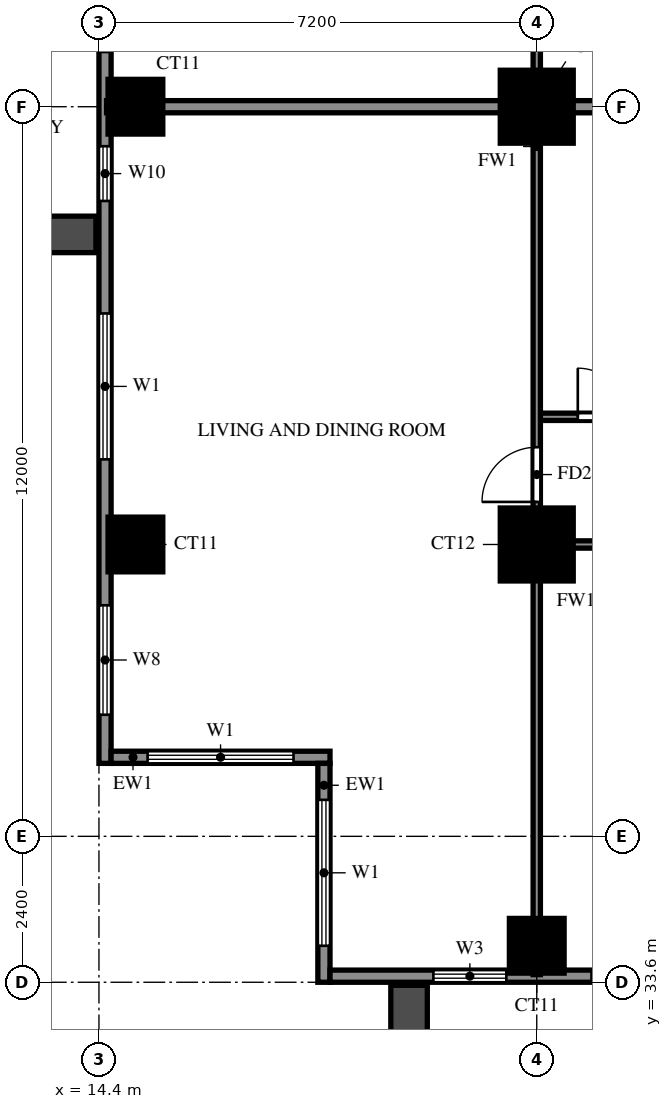
"""IFC4 building model, lengths in metres.
Left out: names, types, materials, properties, quantities, classifications, styles, units other than length and angle.
Written with IfcOpenShell. Run it as: python <this file> out.ifc"""

import sys

from ifc_helpers import new_model, si_unit, direction, frame, frame_2d, origin, origin_2d, place, context, subcontext, project, spatial, rectangle, extrude, source, transform, mapped, element, fill, save


model = new_model("IFC4")
c1 = context("Model", 3, precision=1e-05, world=origin(), true_north=direction((0.0, 1.0)))
c2 = subcontext(c1, "Body", "Model", "MODEL_VIEW")
j1 = project(units=[si_unit("LENGTHUNIT", "METRE"), si_unit("PLANEANGLEUNIT", "RADIAN")], contexts=[c1])
p1 = place(None, origin())
s1 = spatial("IfcSite", under=j1, at=p1, CompositionType="ELEMENT")
p2 = place(p1, origin())
s2 = spatial("IfcBuilding", under=s1, at=p2, CompositionType="ELEMENT")
p3 = place(p2, frame((0.0, 0.0, 97.0)))
s3 = spatial("IfcBuildingStorey", under=s2, at=p3, CompositionType="ELEMENT", Elevation=97.0)
m1 = source(origin(), c2, "Body", "SweptSolid", [
    extrude(rectangle(XDim=0.9, YDim=0.9, at=origin_2d()), origin(), (0.0, 0.0, 1.0), 3.18),
])
for number, where, z_axis, x_axis in (
    (1, (21.6, 34.2, 0.0), (0.0, 0.0, 1.0), (1.0, 0.0, 0.0)),
    (2, (15.0, 40.8, 0.0), (0.0, 0.0, 1.0), (1.0, 0.0, 0.0)),
):
    element("IfcColumn", number, at=place(p3, frame(where, z_axis=z_axis, x_axis=x_axis)), inside=s3, PredefinedType="COLUMN", context=c2, shape_type="MappedRepresentation", body=[
        mapped(m1, transform((0.0, 0.0, 0.0))),
    ])
m2 = source(origin(), c2, "Body", "SweptSolid", [
    extrude(rectangle(XDim=1.2, YDim=1.2, at=origin_2d()), origin(), (0.0, 0.0, 1.0), 3.18),
])
p4 = place(p3, frame((21.6, 40.8, 0.0), z_axis=(0.0, 0.0, 1.0), x_axis=(1.0, 0.0, 0.0)))
e3 = element("IfcColumn", 3, at=p4, inside=s3, PredefinedType="COLUMN", context=c2, shape_type="MappedRepresentation", body=[
    mapped(m2, transform((0.0, 0.0, 0.0))),
])
p5 = place(p3, frame((15.0, 48.0, 0.0), z_axis=(0.0, 0.0, 1.0), x_axis=(1.0, 0.0, 0.0)))
e4 = element("IfcColumn", 4, at=p5, inside=s3, PredefinedType="COLUMN", context=c2, shape_type="MappedRepresentation", body=[
    mapped(m1, transform((0.0, 0.0, 0.0))),
])
p6 = place(p3, frame((21.6, 48.0, 0.0), z_axis=(0.0, 0.0, 1.0), x_axis=(1.0, 0.0, 0.0)))
e5 = element("IfcColumn", 5, at=p6, inside=s3, PredefinedType="COLUMN", context=c2, shape_type="MappedRepresentation", body=[
    mapped(m2, transform((0.0, 0.0, 0.0))),
])
p7 = place(p3, frame((14.5, 76.6, 0.0), z_axis=(0.0, 0.0, 1.0), x_axis=(0.0, -1.0, 0.0)))
e6 = element("IfcWall", 6, at=p7, inside=s3, PredefinedType="SOLIDWALL", context=c2, shape_type="SweptSolid", body=[
    extrude(rectangle(XDim=39.4, YDim=0.2, at=frame_2d((19.7, 0.0))), origin(), (0.0, 0.0, 1.0), 3.18),
])
p8 = place(p7, frame((25.9, 0.0, 0.0)))
e7 = element("IfcOpeningElement", 7, at=p8, cuts=e6, PredefinedType="OPENING", context=c2, shape_type="SweptSolid", body=[
    extrude(rectangle(XDim=1.8, YDim=2.4, at=frame_2d((0.9, 1.2))), frame((0.0, 0.11, 0.0), z_axis=(0.0, -1.0, 0.0), x_axis=(1.0, 0.0, 0.0)), (0.0, 0.0, 1.0), 0.22),
])
p9 = place(p7, frame((29.25, 0.0, 0.6)))
e8 = element("IfcOpeningElement", 8, at=p9, cuts=e6, PredefinedType="OPENING", context=c2, shape_type="SweptSolid", body=[
    extrude(rectangle(XDim=0.9, YDim=2.4, at=frame_2d((0.45, 1.2))), frame((0.0, 0.11, 0.0), z_axis=(0.0, -1.0, 0.0), x_axis=(1.0, 0.0, 0.0)), (0.0, 0.0, 1.0), 0.22),
])
p10 = place(p7, frame((32.0, 0.0, 0.6)))
e9 = element("IfcOpeningElement", 9, at=p10, cuts=e6, PredefinedType="OPENING", context=c2, shape_type="SweptSolid", body=[
    extrude(rectangle(XDim=2.4, YDim=2.4, at=frame_2d((1.2, 1.2))), frame((0.0, 0.11, 0.0), z_axis=(0.0, -1.0, 0.0), x_axis=(1.0, 0.0, 0.0)), (0.0, 0.0, 1.0), 0.22),
])
p11 = place(p7, frame((36.8, 0.0, 0.6)))
e10 = element("IfcOpeningElement", 10, at=p11, cuts=e6, PredefinedType="OPENING", context=c2, shape_type="SweptSolid", body=[
    extrude(rectangle(XDim=1.8, YDim=2.4, at=frame_2d((0.9, 1.2))), frame((0.0, 0.11, 0.0), z_axis=(0.0, -1.0, 0.0), x_axis=(1.0, 0.0, 0.0)), (0.0, 0.0, 1.0), 0.22),
])
p12 = place(p7, frame((22.2, 0.0, 0.6)))
e11 = element("IfcOpeningElement", 11, at=p12, cuts=e6, PredefinedType="OPENING", context=c2, shape_type="SweptSolid", body=[
    extrude(rectangle(XDim=1.2, YDim=2.4, at=frame_2d((0.6, 1.2))), frame((0.0, 0.11, 0.0), z_axis=(0.0, -1.0, 0.0), x_axis=(1.0, 0.0, 0.0)), (0.0, 0.0, 1.0), 0.22),
])
p13 = place(p7, frame((24.55, 0.0, 0.6)))
e12 = element("IfcOpeningElement", 12, at=p13, cuts=e6, PredefinedType="OPENING", context=c2, shape_type="SweptSolid", body=[
    extrude(rectangle(XDim=0.9, YDim=2.4, at=frame_2d((0.45, 1.2))), frame((0.0, 0.11, 0.0), z_axis=(0.0, -1.0, 0.0), x_axis=(1.0, 0.0, 0.0)), (0.0, 0.0, 1.0), 0.22),
])
p14 = place(p7, frame((18.2, 0.0, 0.6)))
e13 = element("IfcOpeningElement", 13, at=p14, cuts=e6, PredefinedType="OPENING", context=c2, shape_type="SweptSolid", body=[
    extrude(rectangle(XDim=2.4, YDim=2.4, at=frame_2d((1.2, 1.2))), frame((0.0, 0.11, 0.0), z_axis=(0.0, -1.0, 0.0), x_axis=(1.0, 0.0, 0.0)), (0.0, 0.0, 1.0), 0.22),
])
p15 = place(p7, frame((15.3, 0.0, 0.6)))
e14 = element("IfcOpeningElement", 14, at=p15, cuts=e6, PredefinedType="OPENING", context=c2, shape_type="SweptSolid", body=[
    extrude(rectangle(XDim=1.8, YDim=2.4, at=frame_2d((0.9, 1.2))), frame((0.0, 0.11, 0.0), z_axis=(0.0, -1.0, 0.0), x_axis=(1.0, 0.0, 0.0)), (0.0, 0.0, 1.0), 0.22),
])
p16 = place(p7, frame((11.75, 0.0, 1.5)))
e15 = element("IfcOpeningElement", 15, at=p16, cuts=e6, PredefinedType="OPENING", context=c2, shape_type="SweptSolid", body=[
    extrude(rectangle(XDim=0.9, YDim=0.9, at=frame_2d((0.45, 0.45))), frame((0.0, 0.11, 0.0), z_axis=(0.0, -1.0, 0.0), x_axis=(1.0, 0.0, 0.0)), (0.0, 0.0, 1.0), 0.22),
])
p17 = place(p7, frame((7.8, 0.0, 0.6)))
e16 = element("IfcOpeningElement", 16, at=p17, cuts=e6, PredefinedType="OPENING", context=c2, shape_type="SweptSolid", body=[
    extrude(rectangle(XDim=2.4, YDim=2.4, at=frame_2d((1.2, 1.2))), frame((0.0, 0.11, 0.0), z_axis=(0.0, -1.0, 0.0), x_axis=(1.0, 0.0, 0.0)), (0.0, 0.0, 1.0), 0.22),
])
p18 = place(p7, frame((3.8, 0.0, 0.6)))
e17 = element("IfcOpeningElement", 17, at=p18, cuts=e6, PredefinedType="OPENING", context=c2, shape_type="SweptSolid", body=[
    extrude(rectangle(XDim=2.4, YDim=2.4, at=frame_2d((1.2, 1.2))), frame((0.0, 0.11, 0.0), z_axis=(0.0, -1.0, 0.0), x_axis=(1.0, 0.0, 0.0)), (0.0, 0.0, 1.0), 0.22),
])
p19 = place(p7, frame((0.6, 0.0, 0.6)))
e18 = element("IfcOpeningElement", 18, at=p19, cuts=e6, PredefinedType="OPENING", context=c2, shape_type="SweptSolid", body=[
    extrude(rectangle(XDim=2.4, YDim=2.4, at=frame_2d((1.2, 1.2))), frame((0.0, 0.11, 0.0), z_axis=(0.0, -1.0, 0.0), x_axis=(1.0, 0.0, 0.0)), (0.0, 0.0, 1.0), 0.22),
])
p20 = place(p3, frame((14.6, 37.3, 0.0), z_axis=(0.0, 0.0, 1.0), x_axis=(1.0, 0.0, 0.0)))
e19 = element("IfcWall", 19, at=p20, inside=s3, PredefinedType="SOLIDWALL", context=c2, shape_type="SweptSolid", body=[
    extrude(rectangle(XDim=3.6, YDim=0.2, at=frame_2d((1.8, 0.0))), origin(), (0.0, 0.0, 1.0), 3.18),
])
p21 = place(p20, frame((0.6, 0.0, 0.6)))
e20 = element("IfcOpeningElement", 20, at=p21, cuts=e19, PredefinedType="OPENING", context=c2, shape_type="SweptSolid", body=[
    extrude(rectangle(XDim=2.4, YDim=2.4, at=frame_2d((1.2, 1.2))), frame((0.0, 0.11, 0.0), z_axis=(0.0, -1.0, 0.0), x_axis=(1.0, 0.0, 0.0)), (0.0, 0.0, 1.0), 0.22),
])
p22 = place(p3, frame((18.1, 37.2, 0.0), z_axis=(0.0, 0.0, 1.0), x_axis=(0.0, -1.0, 0.0)))
e21 = element("IfcWall", 21, at=p22, inside=s3, PredefinedType="SOLIDWALL", context=c2, shape_type="SweptSolid", body=[
    extrude(rectangle(XDim=3.6, YDim=0.2, at=frame_2d((1.8, 0.0))), origin(), (0.0, 0.0, 1.0), 3.18),
])
p23 = place(p22, frame((0.6, 0.0, 0.6)))
e22 = element("IfcOpeningElement", 22, at=p23, cuts=e21, PredefinedType="OPENING", context=c2, shape_type="SweptSolid", body=[
    extrude(rectangle(XDim=2.4, YDim=2.4, at=frame_2d((1.2, 1.2))), frame((0.0, 0.11, 0.0), z_axis=(0.0, -1.0, 0.0), x_axis=(1.0, 0.0, 0.0)), (0.0, 0.0, 1.0), 0.22),
])
p24 = place(p3, frame((18.2, 33.7, 0.0), z_axis=(0.0, 0.0, 1.0), x_axis=(1.0, 0.0, 0.0)))
e23 = element("IfcWall", 23, at=p24, inside=s3, PredefinedType="SOLIDWALL", context=c2, shape_type="SweptSolid", body=[
    extrude(rectangle(XDim=23.8, YDim=0.2, at=frame_2d((11.9, 0.0))), origin(), (0.0, 0.0, 1.0), 3.18),
])
p25 = place(p24, frame((4.3, 0.0, 0.0)))
e24 = element("IfcOpeningElement", 24, at=p25, cuts=e23, PredefinedType="OPENING", context=c2, shape_type="SweptSolid", body=[
    extrude(rectangle(XDim=1.8, YDim=2.4, at=frame_2d((0.9, 1.2))), frame((0.0, 0.11, 0.0), z_axis=(0.0, -1.0, 0.0), x_axis=(1.0, 0.0, 0.0)), (0.0, 0.0, 1.0), 0.22),
])
p26 = place(p24, frame((18.7, 0.0, 0.0)))
e25 = element("IfcOpeningElement", 25, at=p26, cuts=e23, PredefinedType="OPENING", context=c2, shape_type="SweptSolid", body=[
    extrude(rectangle(XDim=1.8, YDim=2.4, at=frame_2d((0.9, 1.2))), frame((0.0, 0.11, 0.0), z_axis=(0.0, -1.0, 0.0), x_axis=(1.0, 0.0, 0.0)), (0.0, 0.0, 1.0), 0.22),
])
p27 = place(p24, frame((1.7, 0.0, 0.6)))
e26 = element("IfcOpeningElement", 26, at=p27, cuts=e23, PredefinedType="OPENING", context=c2, shape_type="SweptSolid", body=[
    extrude(rectangle(XDim=1.2, YDim=2.4, at=frame_2d((0.6, 1.2))), frame((0.0, 0.11, 0.0), z_axis=(0.0, -1.0, 0.0), x_axis=(1.0, 0.0, 0.0)), (0.0, 0.0, 1.0), 0.22),
])
p28 = place(p24, frame((8.75, 0.0, 1.5)))
e27 = element("IfcOpeningElement", 27, at=p28, cuts=e23, PredefinedType="OPENING", context=c2, shape_type="SweptSolid", body=[
    extrude(rectangle(XDim=0.9, YDim=0.9, at=frame_2d((0.45, 0.45))), frame((0.0, 0.11, 0.0), z_axis=(0.0, -1.0, 0.0), x_axis=(1.0, 0.0, 0.0)), (0.0, 0.0, 1.0), 0.22),
])
p29 = place(p24, frame((11.4, 0.0, 0.6)))
e28 = element("IfcOpeningElement", 28, at=p29, cuts=e23, PredefinedType="OPENING", context=c2, shape_type="SweptSolid", body=[
    extrude(rectangle(XDim=2.4, YDim=2.4, at=frame_2d((1.2, 1.2))), frame((0.0, 0.11, 0.0), z_axis=(0.0, -1.0, 0.0), x_axis=(1.0, 0.0, 0.0)), (0.0, 0.0, 1.0), 0.22),
])
p30 = place(p24, frame((14.35, 0.0, 0.6)))
e29 = element("IfcOpeningElement", 29, at=p30, cuts=e23, PredefinedType="OPENING", context=c2, shape_type="SweptSolid", body=[
    extrude(rectangle(XDim=0.9, YDim=2.4, at=frame_2d((0.45, 1.2))), frame((0.0, 0.11, 0.0), z_axis=(0.0, -1.0, 0.0), x_axis=(1.0, 0.0, 0.0)), (0.0, 0.0, 1.0), 0.22),
])
p31 = place(p24, frame((16.25, 0.0, 0.6)))
e30 = element("IfcOpeningElement", 30, at=p31, cuts=e23, PredefinedType="OPENING", context=c2, shape_type="SweptSolid", body=[
    extrude(rectangle(XDim=0.9, YDim=2.4, at=frame_2d((0.45, 1.2))), frame((0.0, 0.11, 0.0), z_axis=(0.0, -1.0, 0.0), x_axis=(1.0, 0.0, 0.0)), (0.0, 0.0, 1.0), 0.22),
])
p32 = place(p24, frame((20.95, 0.0, 0.6)))
e31 = element("IfcOpeningElement", 31, at=p32, cuts=e23, PredefinedType="OPENING", context=c2, shape_type="SweptSolid", body=[
    extrude(rectangle(XDim=0.9, YDim=2.4, at=frame_2d((0.45, 1.2))), frame((0.0, 0.11, 0.0), z_axis=(0.0, -1.0, 0.0), x_axis=(1.0, 0.0, 0.0)), (0.0, 0.0, 1.0), 0.22),
])
for number, where, z_axis, x_axis in (
    (32, (14.35, 45.9, 0.0), (0.0, 0.0, 1.0), (-1.0, 0.0, 0.0)),
    (33, (19.5, 33.55, 0.0), (0.0, 0.0, 1.0), (0.0, -1.0, 0.0)),
):
    element("IfcWall", number, at=place(p3, frame(where, z_axis=z_axis, x_axis=x_axis)), inside=s3, PredefinedType="SOLIDWALL", context=c2, shape_type="SweptSolid", body=[
        extrude(rectangle(XDim=2.65, YDim=0.6, at=frame_2d((1.325, 0.0))), origin(), (0.0, 0.0, 1.0), 2.85),
    ])
p33 = place(p3, frame((14.525, 48.0, 0.0), z_axis=(0.0, 0.0, 1.0), x_axis=(1.0, 0.0, 0.0)))
e34 = element("IfcWall", 34, at=p33, inside=s3, PredefinedType="SOLIDWALL", context=c2, shape_type="SweptSolid", body=[
    extrude(rectangle(XDim=19.075, YDim=0.2, at=frame_2d((9.538, 0.0))), origin(), (0.0, 0.0, 1.0), 3.18),
])
p34 = place(p3, frame((21.6, 40.8, 0.0), z_axis=(0.0, 0.0, 1.0), x_axis=(1.0, 0.0, 0.0)))
e35 = element("IfcWall", 35, at=p34, inside=s3, PredefinedType="PARTITIONING", context=c2, shape_type="SweptSolid", body=[
    extrude(rectangle(XDim=3.6, YDim=0.12, at=frame_2d((1.8, 0.0))), origin(), (0.0, 0.0, 1.0), 3.18),
])
p35 = place(p34, frame((1.35, 0.0, 0.0)))
e36 = element("IfcOpeningElement", 36, at=p35, cuts=e35, PredefinedType="OPENING", context=c2, shape_type="SweptSolid", body=[
    extrude(rectangle(XDim=0.9, YDim=2.1, at=frame_2d((0.45, 1.05))), frame((0.0, 0.07, 0.0), z_axis=(0.0, -1.0, 0.0), x_axis=(1.0, 0.0, 0.0)), (0.0, 0.0, 1.0), 0.14),
])
p36 = place(p3, frame((21.6, 42.9, 0.0), z_axis=(0.0, 0.0, 1.0), x_axis=(1.0, 0.0, 0.0)))
e37 = element("IfcWall", 37, at=p36, inside=s3, PredefinedType="PARTITIONING", context=c2, shape_type="SweptSolid", body=[
    extrude(rectangle(XDim=12.0, YDim=0.12, at=frame_2d((6.0, 0.0))), origin(), (0.0, 0.0, 1.0), 3.18),
])
p37 = place(p36, frame((0.675, 0.0, 0.0)))
e38 = element("IfcOpeningElement", 38, at=p37, cuts=e37, PredefinedType="OPENING", context=c2, shape_type="SweptSolid", body=[
    extrude(rectangle(XDim=0.8, YDim=2.1, at=frame_2d((0.4, 1.05))), frame((0.0, 0.07, 0.0), z_axis=(0.0, -1.0, 0.0), x_axis=(1.0, 0.0, 0.0)), (0.0, 0.0, 1.0), 0.14),
])
p38 = place(p36, frame((4.0, 0.0, 0.0)))
e39 = element("IfcOpeningElement", 39, at=p38, cuts=e37, PredefinedType="OPENING", context=c2, shape_type="SweptSolid", body=[
    extrude(rectangle(XDim=0.9, YDim=2.1, at=frame_2d((0.45, 1.05))), frame((0.0, 0.07, 0.0), z_axis=(0.0, -1.0, 0.0), x_axis=(1.0, 0.0, 0.0)), (0.0, 0.0, 1.0), 0.14),
])
p39 = place(p36, frame((7.475, 0.0, 0.0)))
e40 = element("IfcOpeningElement", 40, at=p39, cuts=e37, PredefinedType="OPENING", context=c2, shape_type="SweptSolid", body=[
    extrude(rectangle(XDim=0.9, YDim=2.1, at=frame_2d((0.45, 1.05))), frame((0.0, 0.07, 0.0), z_axis=(0.0, -1.0, 0.0), x_axis=(1.0, 0.0, 0.0)), (0.0, 0.0, 1.0), 0.14),
])
p40 = place(p36, frame((10.1, 0.0, 0.0)))
e41 = element("IfcOpeningElement", 41, at=p40, cuts=e37, PredefinedType="OPENING", context=c2, shape_type="SweptSolid", body=[
    extrude(rectangle(XDim=0.9, YDim=2.1, at=frame_2d((0.45, 1.05))), frame((0.0, 0.07, 0.0), z_axis=(0.0, -1.0, 0.0), x_axis=(1.0, 0.0, 0.0)), (0.0, 0.0, 1.0), 0.14),
])
p41 = place(p3, frame((21.6, 33.725, 0.0), z_axis=(0.0, 0.0, 1.0), x_axis=(0.0, 1.0, 0.0)))
e42 = element("IfcWall", 42, at=p41, inside=s3, PredefinedType="PARTITIONING", context=c2, shape_type="SweptSolid", body=[
    extrude(rectangle(XDim=28.675, YDim=0.12, at=frame_2d((14.337, 0.0))), origin(), (0.0, 0.0, 1.0), 3.18),
])
p42 = place(p41, frame((7.775, 0.0, 0.0)))
e43 = element("IfcOpeningElement", 43, at=p42, cuts=e42, PredefinedType="OPENING", context=c2, shape_type="SweptSolid", body=[
    extrude(rectangle(XDim=0.9, YDim=2.1, at=frame_2d((0.45, 1.05))), frame((0.0, 0.07, 0.0), z_axis=(0.0, -1.0, 0.0), x_axis=(1.0, 0.0, 0.0)), (0.0, 0.0, 1.0), 0.14),
])
p43 = place(p41, frame((17.125, 0.0, 0.0)))
e44 = element("IfcOpeningElement", 44, at=p43, cuts=e42, PredefinedType="OPENING", context=c2, shape_type="SweptSolid", body=[
    extrude(rectangle(XDim=1.5, YDim=2.1, at=frame_2d((0.75, 1.05))), frame((0.0, 0.07, 0.0), z_axis=(0.0, -1.0, 0.0), x_axis=(1.0, 0.0, 0.0)), (0.0, 0.0, 1.0), 0.14),
])
p44 = place(p41, frame((22.825, 0.0, 0.0)))
e45 = element("IfcOpeningElement", 45, at=p44, cuts=e42, PredefinedType="OPENING", context=c2, shape_type="SweptSolid", body=[
    extrude(rectangle(XDim=0.9, YDim=2.1, at=frame_2d((0.45, 1.05))), frame((0.0, 0.07, 0.0), z_axis=(0.0, -1.0, 0.0), x_axis=(1.0, 0.0, 0.0)), (0.0, 0.0, 1.0), 0.14),
])
p45 = place(p41, frame((26.425, 0.0, 0.0)))
e46 = element("IfcOpeningElement", 46, at=p45, cuts=e42, PredefinedType="OPENING", context=c2, shape_type="SweptSolid", body=[
    extrude(rectangle(XDim=0.9, YDim=2.1, at=frame_2d((0.45, 1.05))), frame((0.0, 0.07, 0.0), z_axis=(0.0, -1.0, 0.0), x_axis=(1.0, 0.0, 0.0)), (0.0, 0.0, 1.0), 0.14),
])
p46 = place(p9, origin())
e47 = element("IfcWindow", 47, at=p46, inside=s3, PartitioningType="SINGLE_PANEL", PredefinedType="WINDOW", context=c2, shape_type="SweptSolid", body=[
    extrude(rectangle(XDim=0.9, YDim=2.4, at=frame_2d((0.45, 1.2))), frame((0.0, 0.03, 0.0), z_axis=(0.0, -1.0, 0.0), x_axis=(1.0, 0.0, 0.0)), (0.0, 0.0, 1.0), 0.06),
])
fill(e8, e47)
p47 = place(p10, origin())
e48 = element("IfcWindow", 48, at=p47, inside=s3, PartitioningType="DOUBLE_PANEL_VERTICAL", PredefinedType="WINDOW", context=c2, shape_type="SweptSolid", body=[
    extrude(rectangle(XDim=2.4, YDim=2.4, at=frame_2d((1.2, 1.2))), frame((0.0, 0.03, 0.0), z_axis=(0.0, -1.0, 0.0), x_axis=(1.0, 0.0, 0.0)), (0.0, 0.0, 1.0), 0.06),
])
fill(e9, e48)
p48 = place(p11, origin())
e49 = element("IfcWindow", 49, at=p48, inside=s3, PartitioningType="DOUBLE_PANEL_VERTICAL", PredefinedType="WINDOW", context=c2, shape_type="SweptSolid", body=[
    extrude(rectangle(XDim=1.8, YDim=2.4, at=frame_2d((0.9, 1.2))), frame((0.0, 0.03, 0.0), z_axis=(0.0, -1.0, 0.0), x_axis=(1.0, 0.0, 0.0)), (0.0, 0.0, 1.0), 0.06),
])
fill(e10, e49)
p49 = place(p21, origin())
e50 = element("IfcWindow", 50, at=p49, inside=s3, PartitioningType="DOUBLE_PANEL_VERTICAL", PredefinedType="WINDOW", context=c2, shape_type="SweptSolid", body=[
    extrude(rectangle(XDim=2.4, YDim=2.4, at=frame_2d((1.2, 1.2))), frame((0.0, 0.03, 0.0), z_axis=(0.0, -1.0, 0.0), x_axis=(1.0, 0.0, 0.0)), (0.0, 0.0, 1.0), 0.06),
])
fill(e20, e50)
p50 = place(p23, origin())
e51 = element("IfcWindow", 51, at=p50, inside=s3, PartitioningType="DOUBLE_PANEL_VERTICAL", PredefinedType="WINDOW", context=c2, shape_type="SweptSolid", body=[
    extrude(rectangle(XDim=2.4, YDim=2.4, at=frame_2d((1.2, 1.2))), frame((0.0, 0.03, 0.0), z_axis=(0.0, -1.0, 0.0), x_axis=(1.0, 0.0, 0.0)), (0.0, 0.0, 1.0), 0.06),
])
fill(e22, e51)
p51 = place(p25, origin())
e52 = element("IfcDoor", 52, at=p51, inside=s3, OperationType="DOUBLE_DOOR_SLIDING", PredefinedType="DOOR", context=c2, shape_type="SweptSolid", body=[
    extrude(rectangle(XDim=1.8, YDim=2.4, at=frame_2d((0.9, 1.2))), frame((0.0, 0.025, 0.0), z_axis=(0.0, -1.0, 0.0), x_axis=(1.0, 0.0, 0.0)), (0.0, 0.0, 1.0), 0.05),
])
fill(e24, e52)
p52 = place(p27, origin())
e53 = element("IfcWindow", 53, at=p52, inside=s3, PartitioningType="SINGLE_PANEL", PredefinedType="WINDOW", context=c2, shape_type="SweptSolid", body=[
    extrude(rectangle(XDim=1.2, YDim=2.4, at=frame_2d((0.6, 1.2))), frame((0.0, 0.03, 0.0), z_axis=(0.0, -1.0, 0.0), x_axis=(1.0, 0.0, 0.0)), (0.0, 0.0, 1.0), 0.06),
])
fill(e26, e53)
p53 = place(p42, origin())
e54 = element("IfcDoor", 54, at=p53, inside=s3, OperationType="SINGLE_SWING_RIGHT", PredefinedType="DOOR", context=c2, shape_type="SweptSolid", body=[
    extrude(rectangle(XDim=0.9, YDim=2.1, at=frame_2d((0.45, 1.05))), frame((0.0, 0.025, 0.0), z_axis=(0.0, -1.0, 0.0), x_axis=(1.0, 0.0, 0.0)), (0.0, 0.0, 1.0), 0.05),
])
fill(e43, e54)
p54 = place(p37, origin())
e55 = element("IfcDoor", 55, at=p54, inside=s3, OperationType="SINGLE_SWING_LEFT", PredefinedType="DOOR", context=c2, shape_type="SweptSolid", body=[
    extrude(rectangle(XDim=0.8, YDim=2.1, at=frame_2d((0.4, 1.05))), frame((0.0, 0.025, 0.0), z_axis=(0.0, -1.0, 0.0), x_axis=(1.0, 0.0, 0.0)), (0.0, 0.0, 1.0), 0.05),
])
fill(e38, e55)
save(model, sys.argv[1])
